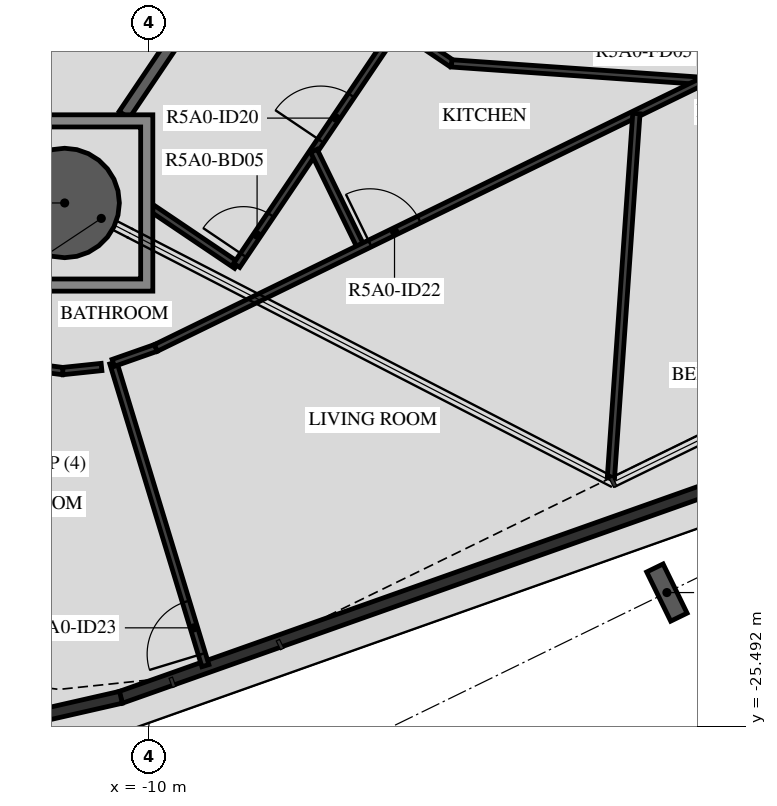
"""IFC4 building model, lengths in metres.
Left out: names, types, materials, properties, quantities, classifications, styles, units other than length and angle.
Written with IfcOpenShell. Run it as: python <this file> out.ifc"""

import sys

from ifc_helpers import new_model, si_unit, direction, frame, frame_2d, origin, origin_2d, place, context, subcontext, project, spatial, polyline, rectangle, hollow_circle, i_section, outline, extrude, element, fill, save


model = new_model("IFC4")
c1 = context("Model", 3, precision=1e-05, world=origin(), true_north=direction((0.0, 1.0)))
c2 = subcontext(c1, "Body", "Model", "MODEL_VIEW")
j1 = project(units=[si_unit("LENGTHUNIT", "METRE"), si_unit("PLANEANGLEUNIT", "RADIAN")], contexts=[c1])
p1 = place(None, origin())
s1 = spatial("IfcSite", under=j1, at=p1, CompositionType="ELEMENT")
p2 = place(p1, origin())
s2 = spatial("IfcBuilding", under=s1, at=p2, CompositionType="ELEMENT")
p3 = place(p2, frame((0.0, 0.0, 188.4)))
s3 = spatial("IfcBuildingStorey", under=s2, at=p3, CompositionType="ELEMENT", Elevation=188.4)
p4 = place(p3, frame((-11.386, -16.881, -0.45), z_axis=(0.0, 0.0, 1.0), x_axis=(1.0, 0.0, 0.0)))
e1 = element("IfcColumn", 1, at=p4, inside=s3, PredefinedType="COLUMN", context=c2, shape_type="SweptSolid", body=[
    extrude(hollow_circle(Radius=0.9, WallThickness=0.04, at=origin_2d()), origin(), (0.0, 0.0, 1.0), 3.57),
])
p5 = place(p3, frame((-1.482, -23.287, -0.45), z_axis=(0.0, 0.0, 1.0), x_axis=(-0.898794095235, -0.438371046456, 0.0)))
e2 = element("IfcColumn", 2, at=p5, inside=s3, PredefinedType="COLUMN", context=c2, shape_type="SweptSolid", body=[
    extrude(i_section(OverallWidth=0.3, OverallDepth=0.9, WebThickness=0.019, FlangeThickness=0.035, FilletRadius=0.03, at=origin_2d()), origin(), (0.0, 0.0, 1.0), 3.57),
])
p6 = place(p3, frame((6.704, -18.931, 0.03), z_axis=(0.0, 0.0, 1.0), x_axis=(-0.942641899569, -0.33380570573, 0.0)))
e3 = element("IfcWall", 3, at=p6, inside=s3, PredefinedType="PARAPET", context=c2, shape_type="SweptSolid", body=[
    extrude(rectangle(XDim=18.214, YDim=0.2, at=frame_2d((9.107, 0.0))), origin(), (0.0, 0.0, 1.0), 1.5),
])
p7 = place(p3, frame((-10.46, -25.01, 0.03), z_axis=(0.0, 0.0, 1.0), x_axis=(-0.97501799573, -0.222125883233, 0.0)))
e4 = element("IfcWall", 4, at=p7, inside=s3, PredefinedType="PARAPET", context=c2, shape_type="SweptSolid", body=[
    extrude(rectangle(XDim=2.258, YDim=0.2, at=frame_2d((1.129, 0.0))), origin(), (0.0, 0.0, 1.0), 1.5),
])
p8 = place(p3, frame((-10.407, -15.43, 0.0), z_axis=(0.0, 0.0, 1.0), x_axis=(0.559038328133, 0.829141813973, 0.0)))
e5 = element("IfcWall", 5, at=p8, inside=s3, PredefinedType="STANDARD", context=c2, shape_type="SweptSolid", body=[
    extrude(rectangle(XDim=5.212, YDim=0.2, at=frame_2d((2.606, 0.0))), origin(), (0.0, 0.0, 1.0), 3.12),
])
p9 = place(p3, frame((-9.936, -16.976, 0.0), z_axis=(0.0, 0.0, 1.0), x_axis=(0.829057888835, -0.559162782167, 0.0)))
e6 = element("IfcWall", 6, at=p9, inside=s3, PredefinedType="PARTITIONING", context=c2, shape_type="SweptSolid", body=[
    extrude(rectangle(XDim=1.664, YDim=0.12, at=frame_2d((0.832, 0.0))), origin(), (0.0, 0.0, 1.0), 3.12),
])
p10 = place(p3, frame((-8.557, -17.906, 0.0), z_axis=(0.0, 0.0, 1.0), x_axis=(0.559194471553, 0.829036514868, 0.0)))
e7 = element("IfcWall", 7, at=p10, inside=s3, PredefinedType="PARTITIONING", context=c2, shape_type="SweptSolid", body=[
    extrude(rectangle(XDim=4.73, YDim=0.12, at=frame_2d((2.365, 0.0))), origin(), (0.0, 0.0, 1.0), 3.12),
])
p11 = place(p10, frame((0.2, 0.0, 0.0)))
e8 = element("IfcOpeningElement", 8, at=p11, cuts=e7, PredefinedType="OPENING", context=c2, shape_type="SweptSolid", body=[
    extrude(rectangle(XDim=0.8, YDim=2.1, at=frame_2d((0.4, 1.05))), frame((0.0, 0.07, 0.0), z_axis=(0.0, -1.0, 0.0), x_axis=(1.0, 0.0, 0.0)), (0.0, 0.0, 1.0), 0.14),
])
p12 = place(p10, frame((2.471, 0.0, 0.0)))
e9 = element("IfcOpeningElement", 9, at=p12, cuts=e7, PredefinedType="OPENING", context=c2, shape_type="SweptSolid", body=[
    extrude(rectangle(XDim=0.9, YDim=2.1, at=frame_2d((0.45, 1.05))), frame((0.0, 0.07, 0.0), z_axis=(0.0, -1.0, 0.0), x_axis=(1.0, 0.0, 0.0)), (0.0, 0.0, 1.0), 0.14),
])
p13 = place(p3, frame((-5.912, -13.985, 0.0), z_axis=(0.0, 0.0, 1.0), x_axis=(0.829027978444, -0.559207127062, 0.0)))
e10 = element("IfcWall", 10, at=p13, inside=s3, PredefinedType="PARTITIONING", context=c2, shape_type="SweptSolid", body=[
    extrude(rectangle(XDim=1.073, YDim=0.12, at=frame_2d((0.537, 0.0))), origin(), (0.0, 0.0, 1.0), 3.12),
])
p14 = place(p3, frame((-5.022, -14.585, 0.0), z_axis=(0.0, 0.0, 1.0), x_axis=(0.997565118395, -0.069741197017, 0.0)))
e11 = element("IfcWall", 11, at=p14, inside=s3, PredefinedType="PARTITIONING", context=c2, shape_type="SweptSolid", body=[
    extrude(rectangle(XDim=7.985, YDim=0.12, at=frame_2d((3.993, 0.0))), origin(), (0.0, 0.0, 1.0), 3.12),
])
p15 = place(p14, frame((4.346, 0.0, 0.0)))
e12 = element("IfcOpeningElement", 12, at=p15, cuts=e11, PredefinedType="OPENING", context=c2, shape_type="SweptSolid", body=[
    extrude(rectangle(XDim=0.9, YDim=2.1, at=frame_2d((0.45, 1.05))), frame((0.0, 0.07, 0.0), z_axis=(0.0, -1.0, 0.0), x_axis=(1.0, 0.0, 0.0)), (0.0, 0.0, 1.0), 0.14),
])
p16 = place(p3, frame((-10.78, -19.578, 0.0), z_axis=(0.0, 0.0, 1.0), x_axis=(-0.994515867502, -0.104585798686, 0.0)))
e13 = element("IfcWall", 13, at=p16, inside=s3, PredefinedType="PARTITIONING", context=c2, shape_type="SweptSolid", body=[
    extrude(rectangle(XDim=0.642, YDim=0.12, at=frame_2d((0.321, 0.0))), origin(), (0.0, 0.0, 1.0), 3.12),
])
p17 = place(p3, frame((-11.418, -19.645, 0.0), z_axis=(0.0, 0.0, 1.0), x_axis=(-0.991802759529, 0.127778269633, 0.0)))
e14 = element("IfcWall", 14, at=p17, inside=s3, PredefinedType="PARTITIONING", context=c2, shape_type="SweptSolid", body=[
    extrude(rectangle(XDim=0.642, YDim=0.12, at=frame_2d((0.321, 0.0))), origin(), (0.0, 0.0, 1.0), 3.12),
])
p18 = place(p3, frame((-9.072, -24.489, 0.0), z_axis=(0.0, 0.0, 1.0), x_axis=(-0.291025348593, 0.956715342449, 0.0)))
e15 = element("IfcWall", 15, at=p18, inside=s3, PredefinedType="PARTITIONING", context=c2, shape_type="SweptSolid", body=[
    extrude(rectangle(XDim=5.205, YDim=0.12, at=frame_2d((2.602, 0.0))), origin(), (0.0, 0.0, 1.0), 3.12),
])
p19 = place(p18, frame((0.2, 0.0, 0.0)))
e16 = element("IfcOpeningElement", 16, at=p19, cuts=e15, PredefinedType="OPENING", context=c2, shape_type="SweptSolid", body=[
    extrude(rectangle(XDim=0.9, YDim=2.1, at=frame_2d((0.45, 1.05))), frame((0.0, 0.07, 0.0), z_axis=(0.0, -1.0, 0.0), x_axis=(1.0, 0.0, 0.0)), (0.0, 0.0, 1.0), 0.14),
])
p20 = place(p3, frame((-6.51, -17.617, 0.0), z_axis=(0.0, 0.0, 1.0), x_axis=(-0.438380229518, 0.898789616299, 0.0)))
e17 = element("IfcWall", 17, at=p20, inside=s3, PredefinedType="PARTITIONING", context=c2, shape_type="SweptSolid", body=[
    extrude(rectangle(XDim=1.773, YDim=0.12, at=frame_2d((0.887, 0.0))), origin(), (0.0, 0.0, 1.0), 3.12),
])
p21 = place(p3, frame((-10.586, -19.51, 0.0), z_axis=(0.0, 0.0, 1.0), x_axis=(0.943560277016, 0.3312008509, 0.0)))
e18 = element("IfcWall", 18, at=p21, inside=s3, PredefinedType="PARTITIONING", context=c2, shape_type="SweptSolid", body=[
    extrude(rectangle(XDim=0.741, YDim=0.12, at=frame_2d((0.371, 0.0))), origin(), (0.0, 0.0, 1.0), 3.12),
])
p22 = place(p3, frame((-9.886, -19.264, 0.0), z_axis=(0.0, 0.0, 1.0), x_axis=(0.898796326112, 0.43836647245, 0.0)))
e19 = element("IfcWall", 19, at=p22, inside=s3, PredefinedType="PARTITIONING", context=c2, shape_type="SweptSolid", body=[
    extrude(rectangle(XDim=10.014, YDim=0.12, at=frame_2d((5.007, 0.0))), origin(), (0.0, 0.0, 1.0), 3.12),
])
p23 = place(p22, frame((3.917, 0.0, 0.0)))
e20 = element("IfcOpeningElement", 20, at=p23, cuts=e19, PredefinedType="OPENING", context=c2, shape_type="SweptSolid", body=[
    extrude(rectangle(XDim=0.9, YDim=2.1, at=frame_2d((0.45, 1.05))), frame((0.0, 0.07, 0.0), z_axis=(0.0, -1.0, 0.0), x_axis=(1.0, 0.0, 0.0)), (0.0, 0.0, 1.0), 0.14),
])
p24 = place(p3, frame((-2.403, -21.4, 0.0), z_axis=(0.0, 0.0, 1.0), x_axis=(0.069729998801, 0.997565901215, 0.0)))
e21 = element("IfcWall", 21, at=p24, inside=s3, PredefinedType="PARTITIONING", context=c2, shape_type="SweptSolid", body=[
    extrude(rectangle(XDim=6.005, YDim=0.12, at=frame_2d((3.002, 0.0))), origin(), (0.0, 0.0, 1.0), 3.12),
])
p25 = place(p3, origin())
e22 = element("IfcWall", 22, at=p25, inside=s3, PredefinedType="STANDARD", context=c2, shape_type="SweptSolid", body=[
    extrude(outline(polyline([(-9.936, -15.43), (-9.936, -18.331), (-12.836, -18.331), (-12.836, -15.43), (-9.936, -15.43)]), holes=[polyline([(-12.636, -18.131), (-10.136, -18.131), (-10.136, -15.631), (-12.636, -15.631), (-12.636, -18.131)])]), origin(), (0.0, 0.0, 1.0), 3.12),
])
p26 = place(p11, origin())
e23 = element("IfcDoor", 23, at=p26, inside=s3, OperationType="SINGLE_SWING_LEFT", PredefinedType="DOOR", context=c2, shape_type="SweptSolid", body=[
    extrude(rectangle(XDim=0.8, YDim=2.1, at=frame_2d((0.4, 1.05))), frame((0.0, 0.025, 0.0), z_axis=(0.0, -1.0, 0.0), x_axis=(1.0, 0.0, 0.0)), (0.0, 0.0, 1.0), 0.05),
])
fill(e8, e23)
p27 = place(p12, origin())
e24 = element("IfcDoor", 24, at=p27, inside=s3, OperationType="SINGLE_SWING_LEFT", PredefinedType="DOOR", context=c2, shape_type="SweptSolid", body=[
    extrude(rectangle(XDim=0.9, YDim=2.1, at=frame_2d((0.45, 1.05))), frame((0.0, 0.025, 0.0), z_axis=(0.0, -1.0, 0.0), x_axis=(1.0, 0.0, 0.0)), (0.0, 0.0, 1.0), 0.05),
])
fill(e9, e24)
p28 = place(p23, origin())
e25 = element("IfcDoor", 25, at=p28, inside=s3, OperationType="SINGLE_SWING_LEFT", PredefinedType="DOOR", context=c2, shape_type="SweptSolid", body=[
    extrude(rectangle(XDim=0.9, YDim=2.1, at=frame_2d((0.45, 1.05))), frame((0.0, 0.025, 0.0), z_axis=(0.0, -1.0, 0.0), x_axis=(1.0, 0.0, 0.0)), (0.0, 0.0, 1.0), 0.05),
])
fill(e20, e25)
p29 = place(p19, origin())
e26 = element("IfcDoor", 26, at=p29, inside=s3, OperationType="SINGLE_SWING_LEFT", PredefinedType="DOOR", context=c2, shape_type="SweptSolid", body=[
    extrude(rectangle(XDim=0.9, YDim=2.1, at=frame_2d((0.45, 1.05))), frame((0.0, 0.025, 0.0), z_axis=(0.0, -1.0, 0.0), x_axis=(1.0, 0.0, 0.0)), (0.0, 0.0, 1.0), 0.05),
])
fill(e16, e26)
save(model, sys.argv[1])
